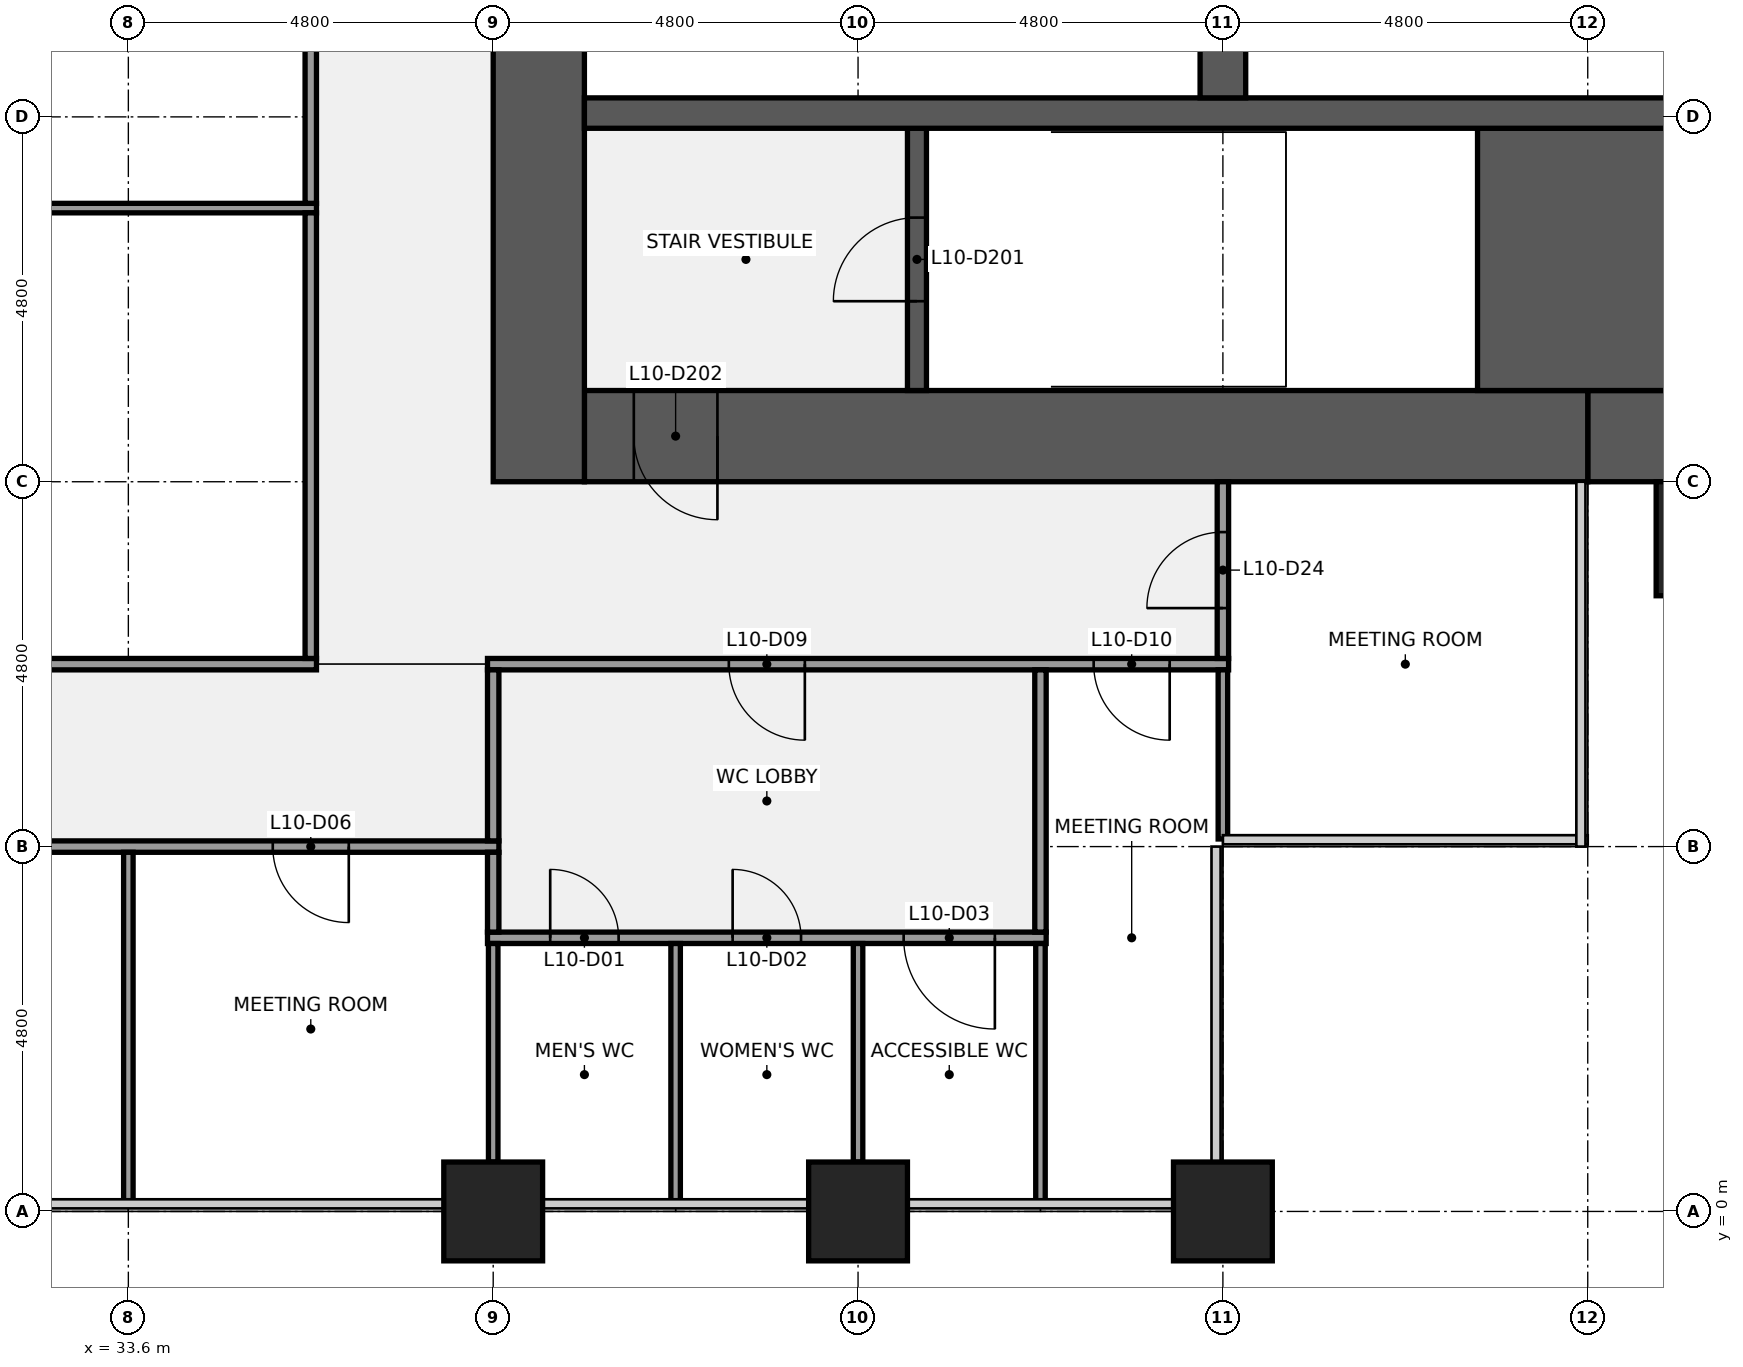
"""IFC4 building model, lengths in metres.
Left out: names, types, materials, properties, quantities, classifications, styles, units other than length and angle.
Written with IfcOpenShell. Run it as: python <this file> out.ifc"""

import sys

from ifc_helpers import new_model, si_unit, direction, frame, frame_2d, origin, origin_2d, place, context, subcontext, project, spatial, rectangle, extrude, element, fill, save


model = new_model("IFC4")
c1 = context("Model", 3, precision=1e-05, world=origin(), true_north=direction((0.0, 1.0)))
c2 = subcontext(c1, "Body", "Model", "MODEL_VIEW")
j1 = project(units=[si_unit("LENGTHUNIT", "METRE"), si_unit("PLANEANGLEUNIT", "RADIAN")], contexts=[c1])
p1 = place(None, origin())
s1 = spatial("IfcSite", under=j1, at=p1, CompositionType="ELEMENT")
p2 = place(p1, origin())
s2 = spatial("IfcBuilding", under=s1, at=p2, CompositionType="ELEMENT")
p3 = place(p2, frame((0.0, 0.0, 51.0)))
s3 = spatial("IfcBuildingStorey", under=s2, at=p3, CompositionType="ELEMENT", Elevation=51.0)
for number, where, z_axis, x_axis in (
    (1, (38.4, 0.0, 0.0), (0.0, 0.0, 1.0), (1.0, 0.0, 0.0)),
    (2, (43.2, 0.0, 0.0), (0.0, 0.0, 1.0), (1.0, 0.0, 0.0)),
    (3, (48.0, 0.0, 0.0), (0.0, 0.0, 1.0), (1.0, 0.0, 0.0)),
):
    element("IfcColumn", number, at=place(p3, frame(where, z_axis=z_axis, x_axis=x_axis)), inside=s3, PredefinedType="COLUMN", context=c2, shape_type="SweptSolid", body=[
        extrude(rectangle(XDim=1.3, YDim=1.3, at=origin_2d()), origin(), (0.0, 0.0, 1.0), 4.0),
    ])
p4 = place(p3, frame((56.4, 10.2, 0.0), z_axis=(0.0, 0.0, 1.0), x_axis=(-1.0, 0.0, 0.0)))
e4 = element("IfcWall", 4, at=p4, inside=s3, PredefinedType="SHEAR", context=c2, shape_type="SweptSolid", body=[
    extrude(rectangle(XDim=3.6, YDim=1.2, at=frame_2d((1.8, 0.0))), origin(), (0.0, 0.0, 1.0), 3.84),
])
p5 = place(p3, frame((52.8, 10.2, 0.0), z_axis=(0.0, 0.0, 1.0), x_axis=(-1.0, 0.0, 0.0)))
e5 = element("IfcWall", 5, at=p5, inside=s3, PredefinedType="SHEAR", context=c2, shape_type="SweptSolid", body=[
    extrude(rectangle(XDim=13.2, YDim=1.2, at=frame_2d((6.6, 0.0))), origin(), (0.0, 0.0, 1.0), 3.84),
])
p6 = place(p5, frame((11.45, 0.0, 0.0)))
e6 = element("IfcOpeningElement", 6, at=p6, cuts=e5, PredefinedType="OPENING", context=c2, shape_type="SweptSolid", body=[
    extrude(rectangle(XDim=1.1, YDim=2.1, at=frame_2d((0.55, 1.05))), frame((0.0, 0.61, 0.0), z_axis=(0.0, -1.0, 0.0), x_axis=(1.0, 0.0, 0.0)), (0.0, 0.0, 1.0), 1.22),
])
p7 = place(p3, frame((39.0, 9.6, 0.0), z_axis=(0.0, 0.0, 1.0), x_axis=(0.0, 1.0, 0.0)))
e7 = element("IfcWall", 7, at=p7, inside=s3, PredefinedType="SHEAR", context=c2, shape_type="SweptSolid", body=[
    extrude(rectangle(XDim=28.8, YDim=1.2, at=frame_2d((14.4, 0.0))), origin(), (0.0, 0.0, 1.0), 3.84),
])
p8 = place(p7, frame((8.7, 0.0, 0.0)))
e8 = element("IfcOpeningElement", 8, at=p8, cuts=e7, PredefinedType="OPENING", context=c2, shape_type="SweptSolid", body=[
    extrude(rectangle(XDim=1.8, YDim=2.1, at=frame_2d((0.9, 1.05))), frame((0.0, 0.61, 0.0), z_axis=(0.0, -1.0, 0.0), x_axis=(1.0, 0.0, 0.0)), (0.0, 0.0, 1.0), 1.22),
])
p9 = place(p7, frame((18.3, 0.0, 0.0)))
e9 = element("IfcOpeningElement", 9, at=p9, cuts=e7, PredefinedType="OPENING", context=c2, shape_type="SweptSolid", body=[
    extrude(rectangle(XDim=1.8, YDim=2.1, at=frame_2d((0.9, 1.05))), frame((0.0, 0.61, 0.0), z_axis=(0.0, -1.0, 0.0), x_axis=(1.0, 0.0, 0.0)), (0.0, 0.0, 1.0), 1.22),
])
p10 = place(p3, frame((51.35, 12.525, 0.0), z_axis=(0.0, 0.0, 1.0), x_axis=(1.0, 0.0, 0.0)))
e10 = element("IfcWall", 10, at=p10, inside=s3, PredefinedType="SHEAR", context=c2, shape_type="SweptSolid", body=[
    extrude(rectangle(XDim=5.05, YDim=3.45, at=frame_2d((2.525, 0.0))), origin(), (0.0, 0.0, 1.0), 3.84),
])
p11 = place(p3, frame((43.975, 10.8, 0.0), z_axis=(0.0, 0.0, 1.0), x_axis=(0.0, 1.0, 0.0)))
e11 = element("IfcWall", 11, at=p11, inside=s3, PredefinedType="SHEAR", context=c2, shape_type="SweptSolid", body=[
    extrude(rectangle(XDim=3.45, YDim=0.25, at=frame_2d((1.725, 0.0))), origin(), (0.0, 0.0, 1.0), 3.84),
])
p12 = place(p11, frame((1.175, 0.0, 0.0)))
e12 = element("IfcOpeningElement", 12, at=p12, cuts=e11, PredefinedType="OPENING", context=c2, shape_type="SweptSolid", body=[
    extrude(rectangle(XDim=1.1, YDim=2.1, at=frame_2d((0.55, 1.05))), frame((0.0, 0.135, 0.0), z_axis=(0.0, -1.0, 0.0), x_axis=(1.0, 0.0, 0.0)), (0.0, 0.0, 1.0), 0.27),
])
p13 = place(p3, frame((39.6, 14.45, 0.0), z_axis=(0.0, 0.0, 1.0), x_axis=(1.0, 0.0, 0.0)))
e13 = element("IfcWall", 13, at=p13, inside=s3, PredefinedType="SHEAR", context=c2, shape_type="SweptSolid", body=[
    extrude(rectangle(XDim=16.8, YDim=0.4, at=frame_2d((8.4, 0.0))), origin(), (0.0, 0.0, 1.0), 3.84),
])
p14 = place(p3, frame((48.0, 14.65, 0.0), z_axis=(0.0, 0.0, 1.0), x_axis=(0.0, 1.0, 0.0)))
e14 = element("IfcWall", 14, at=p14, inside=s3, PredefinedType="SHEAR", context=c2, shape_type="SweptSolid", body=[
    extrude(rectangle(XDim=2.6, YDim=0.6, at=frame_2d((1.3, 0.0))), origin(), (0.0, 0.0, 1.0), 3.84),
])
p15 = place(p3, frame((38.325, 3.6, 0.0), z_axis=(0.0, 0.0, 1.0), x_axis=(1.0, 0.0, 0.0)))
e15 = element("IfcWall", 15, at=p15, inside=s3, PredefinedType="PARTITIONING", context=c2, shape_type="SweptSolid", body=[
    extrude(rectangle(XDim=7.35, YDim=0.15, at=frame_2d((3.675, 0.0))), origin(), (0.0, 0.0, 1.0), 2.87),
])
p16 = place(p15, frame((0.825, 0.0, 0.0)))
e16 = element("IfcOpeningElement", 16, at=p16, cuts=e15, PredefinedType="OPENING", context=c2, shape_type="SweptSolid", body=[
    extrude(rectangle(XDim=0.9, YDim=2.1, at=frame_2d((0.45, 1.05))), frame((0.0, 0.085, 0.0), z_axis=(0.0, -1.0, 0.0), x_axis=(1.0, 0.0, 0.0)), (0.0, 0.0, 1.0), 0.17),
])
p17 = place(p15, frame((3.225, 0.0, 0.0)))
e17 = element("IfcOpeningElement", 17, at=p17, cuts=e15, PredefinedType="OPENING", context=c2, shape_type="SweptSolid", body=[
    extrude(rectangle(XDim=0.9, YDim=2.1, at=frame_2d((0.45, 1.05))), frame((0.0, 0.085, 0.0), z_axis=(0.0, -1.0, 0.0), x_axis=(1.0, 0.0, 0.0)), (0.0, 0.0, 1.0), 0.17),
])
p18 = place(p15, frame((5.475, 0.0, 0.0)))
e18 = element("IfcOpeningElement", 18, at=p18, cuts=e15, PredefinedType="OPENING", context=c2, shape_type="SweptSolid", body=[
    extrude(rectangle(XDim=1.2, YDim=2.1, at=frame_2d((0.6, 1.05))), frame((0.0, 0.085, 0.0), z_axis=(0.0, -1.0, 0.0), x_axis=(1.0, 0.0, 0.0)), (0.0, 0.0, 1.0), 0.17),
])
p19 = place(p3, frame((19.125, 4.8, 0.0), z_axis=(0.0, 0.0, 1.0), x_axis=(1.0, 0.0, 0.0)))
e19 = element("IfcWall", 19, at=p19, inside=s3, PredefinedType="PARTITIONING", context=c2, shape_type="SweptSolid", body=[
    extrude(rectangle(XDim=19.35, YDim=0.15, at=frame_2d((9.675, 0.0))), origin(), (0.0, 0.0, 1.0), 2.87),
])
p20 = place(p19, frame((1.975, 0.0, 0.0)))
e20 = element("IfcOpeningElement", 20, at=p20, cuts=e19, PredefinedType="OPENING", context=c2, shape_type="SweptSolid", body=[
    extrude(rectangle(XDim=1.0, YDim=2.1, at=frame_2d((0.5, 1.05))), frame((0.0, 0.085, 0.0), z_axis=(0.0, -1.0, 0.0), x_axis=(1.0, 0.0, 0.0)), (0.0, 0.0, 1.0), 0.17),
])
p21 = place(p19, frame((9.175, 0.0, 0.0)))
e21 = element("IfcOpeningElement", 21, at=p21, cuts=e19, PredefinedType="OPENING", context=c2, shape_type="SweptSolid", body=[
    extrude(rectangle(XDim=1.0, YDim=2.1, at=frame_2d((0.5, 1.05))), frame((0.0, 0.085, 0.0), z_axis=(0.0, -1.0, 0.0), x_axis=(1.0, 0.0, 0.0)), (0.0, 0.0, 1.0), 0.17),
])
p22 = place(p19, frame((16.375, 0.0, 0.0)))
e22 = element("IfcOpeningElement", 22, at=p22, cuts=e19, PredefinedType="OPENING", context=c2, shape_type="SweptSolid", body=[
    extrude(rectangle(XDim=1.0, YDim=2.1, at=frame_2d((0.5, 1.05))), frame((0.0, 0.085, 0.0), z_axis=(0.0, -1.0, 0.0), x_axis=(1.0, 0.0, 0.0)), (0.0, 0.0, 1.0), 0.17),
])
p23 = place(p3, frame((21.525, 7.2, 0.0), z_axis=(0.0, 0.0, 1.0), x_axis=(1.0, 0.0, 0.0)))
e23 = element("IfcWall", 23, at=p23, inside=s3, PredefinedType="PARTITIONING", context=c2, shape_type="SweptSolid", body=[
    extrude(rectangle(XDim=14.55, YDim=0.15, at=frame_2d((7.275, 0.0))), origin(), (0.0, 0.0, 1.0), 2.87),
])
p24 = place(p23, frame((6.775, 0.0, 0.0)))
e24 = element("IfcOpeningElement", 24, at=p24, cuts=e23, PredefinedType="OPENING", context=c2, shape_type="SweptSolid", body=[
    extrude(rectangle(XDim=1.0, YDim=2.1, at=frame_2d((0.5, 1.05))), frame((0.0, 0.085, 0.0), z_axis=(0.0, -1.0, 0.0), x_axis=(1.0, 0.0, 0.0)), (0.0, 0.0, 1.0), 0.17),
])
p25 = place(p3, frame((38.325, 7.2, 0.0), z_axis=(0.0, 0.0, 1.0), x_axis=(1.0, 0.0, 0.0)))
e25 = element("IfcWall", 25, at=p25, inside=s3, PredefinedType="PARTITIONING", context=c2, shape_type="SweptSolid", body=[
    extrude(rectangle(XDim=9.75, YDim=0.15, at=frame_2d((4.875, 0.0))), origin(), (0.0, 0.0, 1.0), 2.87),
])
p26 = place(p25, frame((3.175, 0.0, 0.0)))
e26 = element("IfcOpeningElement", 26, at=p26, cuts=e25, PredefinedType="OPENING", context=c2, shape_type="SweptSolid", body=[
    extrude(rectangle(XDim=1.0, YDim=2.1, at=frame_2d((0.5, 1.05))), frame((0.0, 0.085, 0.0), z_axis=(0.0, -1.0, 0.0), x_axis=(1.0, 0.0, 0.0)), (0.0, 0.0, 1.0), 0.17),
])
p27 = place(p25, frame((7.975, 0.0, 0.0)))
e27 = element("IfcOpeningElement", 27, at=p27, cuts=e25, PredefinedType="OPENING", context=c2, shape_type="SweptSolid", body=[
    extrude(rectangle(XDim=1.0, YDim=2.1, at=frame_2d((0.5, 1.05))), frame((0.0, 0.085, 0.0), z_axis=(0.0, -1.0, 0.0), x_axis=(1.0, 0.0, 0.0)), (0.0, 0.0, 1.0), 0.17),
])
p28 = place(p3, frame((21.525, 13.2, 0.0), z_axis=(0.0, 0.0, 1.0), x_axis=(1.0, 0.0, 0.0)))
e28 = element("IfcWall", 28, at=p28, inside=s3, PredefinedType="PARTITIONING", context=c2, shape_type="SweptSolid", body=[
    extrude(rectangle(XDim=14.55, YDim=0.125, at=frame_2d((7.275, 0.0))), origin(), (0.0, 0.0, 1.0), 2.87),
])
p29 = place(p3, frame((33.6, 0.1, 0.0), z_axis=(0.0, 0.0, 1.0), x_axis=(0.0, 1.0, 0.0)))
e29 = element("IfcWall", 29, at=p29, inside=s3, PredefinedType="PARTITIONING", context=c2, shape_type="SweptSolid", body=[
    extrude(rectangle(XDim=4.625, YDim=0.125, at=frame_2d((2.312, 0.0))), origin(), (0.0, 0.0, 1.0), 2.87),
])
p30 = place(p3, frame((36.0, 7.275, 0.0), z_axis=(0.0, 0.0, 1.0), x_axis=(0.0, 1.0, 0.0)))
e30 = element("IfcWall", 30, at=p30, inside=s3, PredefinedType="PARTITIONING", context=c2, shape_type="SweptSolid", body=[
    extrude(rectangle(XDim=5.863, YDim=0.15, at=frame_2d((2.931, 0.0))), origin(), (0.0, 0.0, 1.0), 2.87),
])
p31 = place(p3, frame((36.0, 13.262, 0.0), z_axis=(0.0, 0.0, 1.0), x_axis=(0.0, 1.0, 0.0)))
e31 = element("IfcWall", 31, at=p31, inside=s3, PredefinedType="PARTITIONING", context=c2, shape_type="SweptSolid", body=[
    extrude(rectangle(XDim=7.075, YDim=0.15, at=frame_2d((3.538, 0.0))), origin(), (0.0, 0.0, 1.0), 2.87),
])
p32 = place(p31, frame((3.038, 0.0, 0.0)))
e32 = element("IfcOpeningElement", 32, at=p32, cuts=e31, PredefinedType="OPENING", context=c2, shape_type="SweptSolid", body=[
    extrude(rectangle(XDim=1.0, YDim=2.1, at=frame_2d((0.5, 1.05))), frame((0.0, 0.085, 0.0), z_axis=(0.0, -1.0, 0.0), x_axis=(1.0, 0.0, 0.0)), (0.0, 0.0, 1.0), 0.17),
])
p33 = place(p3, frame((38.4, 0.65, 0.0), z_axis=(0.0, 0.0, 1.0), x_axis=(0.0, 1.0, 0.0)))
e33 = element("IfcWall", 33, at=p33, inside=s3, PredefinedType="PARTITIONING", context=c2, shape_type="SweptSolid", body=[
    extrude(rectangle(XDim=2.875, YDim=0.125, at=frame_2d((1.438, 0.0))), origin(), (0.0, 0.0, 1.0), 2.87),
])
p34 = place(p3, frame((38.4, 3.675, 0.0), z_axis=(0.0, 0.0, 1.0), x_axis=(0.0, 1.0, 0.0)))
e34 = element("IfcWall", 34, at=p34, inside=s3, PredefinedType="PARTITIONING", context=c2, shape_type="SweptSolid", body=[
    extrude(rectangle(XDim=1.05, YDim=0.15, at=frame_2d((0.525, 0.0))), origin(), (0.0, 0.0, 1.0), 2.87),
])
p35 = place(p3, frame((38.4, 4.875, 0.0), z_axis=(0.0, 0.0, 1.0), x_axis=(0.0, 1.0, 0.0)))
e35 = element("IfcWall", 35, at=p35, inside=s3, PredefinedType="PARTITIONING", context=c2, shape_type="SweptSolid", body=[
    extrude(rectangle(XDim=2.25, YDim=0.15, at=frame_2d((1.125, 0.0))), origin(), (0.0, 0.0, 1.0), 2.87),
])
p36 = place(p3, frame((40.8, 0.1, 0.0), z_axis=(0.0, 0.0, 1.0), x_axis=(0.0, 1.0, 0.0)))
e36 = element("IfcWall", 36, at=p36, inside=s3, PredefinedType="PARTITIONING", context=c2, shape_type="SweptSolid", body=[
    extrude(rectangle(XDim=3.425, YDim=0.125, at=frame_2d((1.712, 0.0))), origin(), (0.0, 0.0, 1.0), 2.87),
])
p37 = place(p3, frame((43.2, 0.65, 0.0), z_axis=(0.0, 0.0, 1.0), x_axis=(0.0, 1.0, 0.0)))
e37 = element("IfcWall", 37, at=p37, inside=s3, PredefinedType="PARTITIONING", context=c2, shape_type="SweptSolid", body=[
    extrude(rectangle(XDim=2.875, YDim=0.125, at=frame_2d((1.438, 0.0))), origin(), (0.0, 0.0, 1.0), 2.87),
])
p38 = place(p3, frame((45.6, 0.1, 0.0), z_axis=(0.0, 0.0, 1.0), x_axis=(0.0, 1.0, 0.0)))
e38 = element("IfcWall", 38, at=p38, inside=s3, PredefinedType="PARTITIONING", context=c2, shape_type="SweptSolid", body=[
    extrude(rectangle(XDim=3.425, YDim=0.125, at=frame_2d((1.712, 0.0))), origin(), (0.0, 0.0, 1.0), 2.87),
])
p39 = place(p3, frame((45.6, 3.675, 0.0), z_axis=(0.0, 0.0, 1.0), x_axis=(0.0, 1.0, 0.0)))
e39 = element("IfcWall", 39, at=p39, inside=s3, PredefinedType="PARTITIONING", context=c2, shape_type="SweptSolid", body=[
    extrude(rectangle(XDim=3.45, YDim=0.15, at=frame_2d((1.725, 0.0))), origin(), (0.0, 0.0, 1.0), 2.87),
])
p40 = place(p3, frame((48.0, 4.9, 0.0), z_axis=(0.0, 0.0, 1.0), x_axis=(0.0, 1.0, 0.0)))
e40 = element("IfcWall", 40, at=p40, inside=s3, PredefinedType="PARTITIONING", context=c2, shape_type="SweptSolid", body=[
    extrude(rectangle(XDim=2.225, YDim=0.125, at=frame_2d((1.113, 0.0))), origin(), (0.0, 0.0, 1.0), 2.87),
])
p41 = place(p3, frame((48.0, 7.275, 0.0), z_axis=(0.0, 0.0, 1.0), x_axis=(0.0, 1.0, 0.0)))
e41 = element("IfcWall", 41, at=p41, inside=s3, PredefinedType="PARTITIONING", context=c2, shape_type="SweptSolid", body=[
    extrude(rectangle(XDim=2.325, YDim=0.15, at=frame_2d((1.163, 0.0))), origin(), (0.0, 0.0, 1.0), 2.87),
])
p42 = place(p41, frame((0.663, 0.0, 0.0)))
e42 = element("IfcOpeningElement", 42, at=p42, cuts=e41, PredefinedType="OPENING", context=c2, shape_type="SweptSolid", body=[
    extrude(rectangle(XDim=1.0, YDim=2.1, at=frame_2d((0.5, 1.05))), frame((0.0, 0.085, 0.0), z_axis=(0.0, -1.0, 0.0), x_axis=(1.0, 0.0, 0.0)), (0.0, 0.0, 1.0), 0.17),
])
p43 = place(p3, frame((55.2, 8.85, 0.0), z_axis=(0.0, 0.0, 1.0), x_axis=(1.0, 0.0, 0.0)))
e43 = element("IfcColumn", 43, at=p43, inside=s3, PredefinedType="PILASTER", context=c2, shape_type="SweptSolid", body=[
    extrude(rectangle(XDim=3.0, YDim=1.5, at=origin_2d()), origin(), (0.0, 0.0, 1.0), 4.0),
])
for number, where, z_axis, x_axis in (
    (44, (38.4, -1.075, 0.0), (0.0, 0.0, 1.0), (1.0, 0.0, 0.0)),
    (45, (43.2, -1.075, 0.0), (0.0, 0.0, 1.0), (1.0, 0.0, 0.0)),
    (46, (48.0, -1.075, 0.0), (0.0, 0.0, 1.0), (1.0, 0.0, 0.0)),
):
    element("IfcColumn", number, at=place(p3, frame(where, z_axis=z_axis, x_axis=x_axis)), inside=s3, PredefinedType="PILASTER", context=c2, shape_type="SweptSolid", body=[
        extrude(rectangle(XDim=4.2, YDim=0.85, at=origin_2d()), origin(), (0.0, 0.0, 1.0), 4.0),
    ])
p44 = place(p12, origin())
e47 = element("IfcDoor", 47, at=p44, inside=s3, OperationType="SINGLE_SWING_LEFT", PredefinedType="DOOR", context=c2, shape_type="SweptSolid", body=[
    extrude(rectangle(XDim=1.1, YDim=2.1, at=frame_2d((0.55, 1.05))), frame((0.0, 0.025, 0.0), z_axis=(0.0, -1.0, 0.0), x_axis=(1.0, 0.0, 0.0)), (0.0, 0.0, 1.0), 0.05),
])
fill(e12, e47)
p45 = place(p6, origin())
e48 = element("IfcDoor", 48, at=p45, inside=s3, OperationType="SINGLE_SWING_LEFT", PredefinedType="DOOR", context=c2, shape_type="SweptSolid", body=[
    extrude(rectangle(XDim=1.1, YDim=2.1, at=frame_2d((0.55, 1.05))), frame((0.0, 0.025, 0.0), z_axis=(0.0, -1.0, 0.0), x_axis=(1.0, 0.0, 0.0)), (0.0, 0.0, 1.0), 0.05),
])
fill(e6, e48)
p46 = place(p16, origin())
e49 = element("IfcDoor", 49, at=p46, inside=s3, OperationType="SINGLE_SWING_LEFT", PredefinedType="DOOR", context=c2, shape_type="SweptSolid", body=[
    extrude(rectangle(XDim=0.9, YDim=2.1, at=frame_2d((0.45, 1.05))), frame((0.0, 0.025, 0.0), z_axis=(0.0, -1.0, 0.0), x_axis=(1.0, 0.0, 0.0)), (0.0, 0.0, 1.0), 0.05),
])
fill(e16, e49)
p47 = place(p17, origin())
e50 = element("IfcDoor", 50, at=p47, inside=s3, OperationType="SINGLE_SWING_LEFT", PredefinedType="DOOR", context=c2, shape_type="SweptSolid", body=[
    extrude(rectangle(XDim=0.9, YDim=2.1, at=frame_2d((0.45, 1.05))), frame((0.0, 0.025, 0.0), z_axis=(0.0, -1.0, 0.0), x_axis=(1.0, 0.0, 0.0)), (0.0, 0.0, 1.0), 0.05),
])
fill(e17, e50)
p48 = place(p18, origin())
e51 = element("IfcDoor", 51, at=p48, inside=s3, OperationType="SINGLE_SWING_RIGHT", PredefinedType="DOOR", context=c2, shape_type="SweptSolid", body=[
    extrude(rectangle(XDim=1.2, YDim=2.1, at=frame_2d((0.6, 1.05))), frame((0.0, 0.025, 0.0), z_axis=(0.0, -1.0, 0.0), x_axis=(1.0, 0.0, 0.0)), (0.0, 0.0, 1.0), 0.05),
])
fill(e18, e51)
p49 = place(p22, origin())
e52 = element("IfcDoor", 52, at=p49, inside=s3, OperationType="SINGLE_SWING_RIGHT", PredefinedType="DOOR", context=c2, shape_type="SweptSolid", body=[
    extrude(rectangle(XDim=1.0, YDim=2.1, at=frame_2d((0.5, 1.05))), frame((0.0, 0.025, 0.0), z_axis=(0.0, -1.0, 0.0), x_axis=(1.0, 0.0, 0.0)), (0.0, 0.0, 1.0), 0.05),
])
fill(e22, e52)
p50 = place(p26, origin())
e53 = element("IfcDoor", 53, at=p50, inside=s3, OperationType="SINGLE_SWING_RIGHT", PredefinedType="DOOR", context=c2, shape_type="SweptSolid", body=[
    extrude(rectangle(XDim=1.0, YDim=2.1, at=frame_2d((0.5, 1.05))), frame((0.0, 0.025, 0.0), z_axis=(0.0, -1.0, 0.0), x_axis=(1.0, 0.0, 0.0)), (0.0, 0.0, 1.0), 0.05),
])
fill(e26, e53)
p51 = place(p27, origin())
e54 = element("IfcDoor", 54, at=p51, inside=s3, OperationType="SINGLE_SWING_RIGHT", PredefinedType="DOOR", context=c2, shape_type="SweptSolid", body=[
    extrude(rectangle(XDim=1.0, YDim=2.1, at=frame_2d((0.5, 1.05))), frame((0.0, 0.025, 0.0), z_axis=(0.0, -1.0, 0.0), x_axis=(1.0, 0.0, 0.0)), (0.0, 0.0, 1.0), 0.05),
])
fill(e27, e54)
p52 = place(p42, origin())
e55 = element("IfcDoor", 55, at=p52, inside=s3, OperationType="SINGLE_SWING_LEFT", PredefinedType="DOOR", context=c2, shape_type="SweptSolid", body=[
    extrude(rectangle(XDim=1.0, YDim=2.1, at=frame_2d((0.5, 1.05))), frame((0.0, 0.025, 0.0), z_axis=(0.0, -1.0, 0.0), x_axis=(1.0, 0.0, 0.0)), (0.0, 0.0, 1.0), 0.05),
])
fill(e42, e55)
save(model, sys.argv[1])
